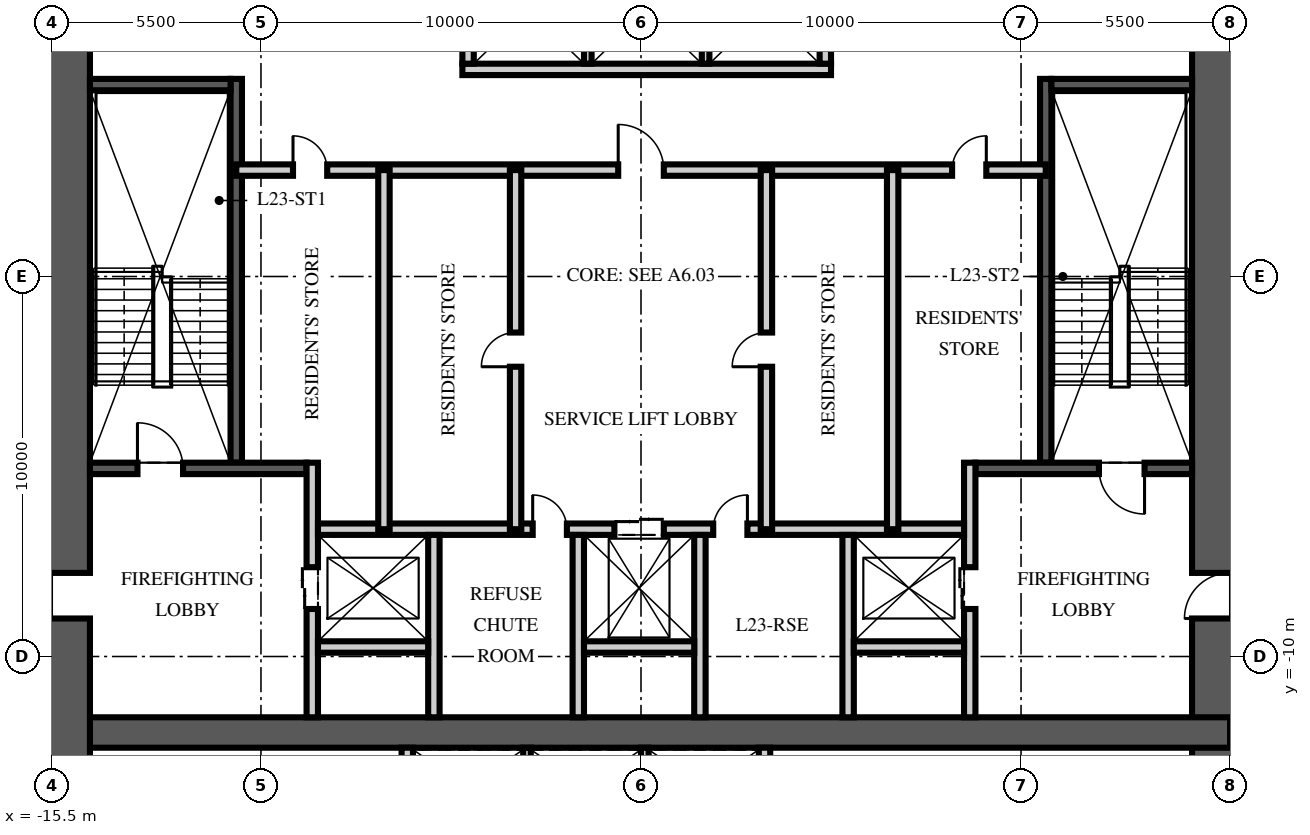
"""IFC4 building model, lengths in metres.
Left out: names, types, materials, properties, quantities, classifications, styles, units other than length and angle.
Written with IfcOpenShell. Run it as: python <this file> out.ifc"""

import sys

from ifc_helpers import new_model, si_unit, direction, frame, frame_2d, origin, place, context, subcontext, project, spatial, rectangle, extrude, element, fill, save


model = new_model("IFC4")
c1 = context("Model", 3, precision=1e-05, world=origin(), true_north=direction((0.0, 1.0)))
c2 = subcontext(c1, "Body", "Model", "MODEL_VIEW")
j1 = project(units=[si_unit("LENGTHUNIT", "METRE"), si_unit("PLANEANGLEUNIT", "RADIAN")], contexts=[c1])
p1 = place(None, origin())
s1 = spatial("IfcSite", under=j1, at=p1, CompositionType="ELEMENT")
p2 = place(p1, origin())
s2 = spatial("IfcBuilding", under=s1, at=p2, CompositionType="ELEMENT")
p3 = place(p2, frame((0.0, 0.0, 92.25)))
s3 = spatial("IfcBuildingStorey", under=s2, at=p3, CompositionType="ELEMENT", Elevation=92.25)
p4 = place(p3, frame((15.5, -15.5, -0.25), z_axis=(0.0, 0.0, 1.0), x_axis=(0.0, 1.0, 0.0)))
e1 = element("IfcWall", 1, at=p4, inside=s3, PredefinedType="SHEAR", context=c2, shape_type="SweptSolid", body=[
    extrude(rectangle(XDim=31.0, YDim=2.0, at=frame_2d((15.5, 0.0))), origin(), (0.0, 0.0, 1.0), 3.75),
])
p5 = place(p4, frame((6.5, 0.0, 0.25)))
e2 = element("IfcOpeningElement", 2, at=p5, cuts=e1, PredefinedType="OPENING", context=c2, shape_type="SweptSolid", body=[
    extrude(rectangle(XDim=1.2, YDim=2.1, at=frame_2d((0.6, 1.05))), frame((0.0, 1.01, 0.0), z_axis=(0.0, -1.0, 0.0), x_axis=(1.0, 0.0, 0.0)), (0.0, 0.0, 1.0), 2.02),
])
p6 = place(p4, frame((23.0, 0.0, 0.25)))
e3 = element("IfcOpeningElement", 3, at=p6, cuts=e1, PredefinedType="OPENING", context=c2, shape_type="SweptSolid", body=[
    extrude(rectangle(XDim=1.8, YDim=2.1, at=frame_2d((0.9, 1.05))), frame((0.0, 1.01, 0.0), z_axis=(0.0, -1.0, 0.0), x_axis=(1.0, 0.0, 0.0)), (0.0, 0.0, 1.0), 2.02),
])
p7 = place(p3, frame((-15.5, -12.0, -0.25), z_axis=(0.0, 0.0, 1.0), x_axis=(1.0, 0.0, 0.0)))
e4 = element("IfcWall", 4, at=p7, inside=s3, PredefinedType="SHEAR", context=c2, shape_type="SweptSolid", body=[
    extrude(rectangle(XDim=31.0, YDim=0.8, at=frame_2d((15.5, 0.0))), origin(), (0.0, 0.0, 1.0), 3.75),
])
p8 = place(p3, frame((-15.5, -15.5, -0.25), z_axis=(0.0, 0.0, 1.0), x_axis=(0.0, 1.0, 0.0)))
e5 = element("IfcWall", 5, at=p8, inside=s3, PredefinedType="SHEAR", context=c2, shape_type="SweptSolid", body=[
    extrude(rectangle(XDim=31.0, YDim=2.0, at=frame_2d((15.5, 0.0))), origin(), (0.0, 0.0, 1.0), 3.75),
])
p9 = place(p8, frame((6.5, 0.0, 0.25)))
e6 = element("IfcOpeningElement", 6, at=p9, cuts=e5, PredefinedType="OPENING", context=c2, shape_type="SweptSolid", body=[
    extrude(rectangle(XDim=1.2, YDim=2.1, at=frame_2d((0.6, 1.05))), frame((0.0, 1.01, 0.0), z_axis=(0.0, -1.0, 0.0), x_axis=(1.0, 0.0, 0.0)), (0.0, 0.0, 1.0), 2.02),
])
p10 = place(p8, frame((23.0, 0.0, 0.25)))
e7 = element("IfcOpeningElement", 7, at=p10, cuts=e5, PredefinedType="OPENING", context=c2, shape_type="SweptSolid", body=[
    extrude(rectangle(XDim=1.8, YDim=2.1, at=frame_2d((0.9, 1.05))), frame((0.0, 1.01, 0.0), z_axis=(0.0, -1.0, 0.0), x_axis=(1.0, 0.0, 0.0)), (0.0, 0.0, 1.0), 2.02),
])
p11 = place(p3, frame((-10.65, -4.9, 0.0), z_axis=(0.0, 0.0, 1.0), x_axis=(0.0, 1.0, 0.0)))
e8 = element("IfcWall", 8, at=p11, inside=s3, PredefinedType="SOLIDWALL", context=c2, shape_type="SweptSolid", body=[
    extrude(rectangle(XDim=10.1, YDim=0.3, at=frame_2d((5.05, 0.0))), origin(), (0.0, 0.0, 1.0), 3.5),
])
p12 = place(p3, frame((-14.5, -5.05, 0.0), z_axis=(0.0, 0.0, 1.0), x_axis=(1.0, 0.0, 0.0)))
e9 = element("IfcWall", 9, at=p12, inside=s3, PredefinedType="SOLIDWALL", context=c2, shape_type="SweptSolid", body=[
    extrude(rectangle(XDim=5.7, YDim=0.3, at=frame_2d((2.85, 0.0))), origin(), (0.0, 0.0, 1.0), 3.5),
])
p13 = place(p12, frame((1.25, 0.0, 0.0)))
e10 = element("IfcOpeningElement", 10, at=p13, cuts=e9, PredefinedType="OPENING", context=c2, shape_type="SweptSolid", body=[
    extrude(rectangle(XDim=1.2, YDim=2.1, at=frame_2d((0.6, 1.05))), frame((0.0, 0.16, 0.0), z_axis=(0.0, -1.0, 0.0), x_axis=(1.0, 0.0, 0.0)), (0.0, 0.0, 1.0), 0.32),
])
p14 = place(p3, frame((-14.5, 5.05, 0.0), z_axis=(0.0, 0.0, 1.0), x_axis=(1.0, 0.0, 0.0)))
e11 = element("IfcWall", 11, at=p14, inside=s3, PredefinedType="SOLIDWALL", context=c2, shape_type="SweptSolid", body=[
    extrude(rectangle(XDim=3.7, YDim=0.3, at=frame_2d((1.85, 0.0))), origin(), (0.0, 0.0, 1.0), 3.5),
])
p15 = place(p3, frame((-8.65, -11.6, 0.0), z_axis=(0.0, 0.0, 1.0), x_axis=(0.0, 1.0, 0.0)))
e12 = element("IfcWall", 12, at=p15, inside=s3, PredefinedType="PARTITIONING", context=c2, shape_type="SweptSolid", body=[
    extrude(rectangle(XDim=6.7, YDim=0.3, at=frame_2d((3.35, 0.0))), origin(), (0.0, 0.0, 1.0), 3.5),
])
p16 = place(p15, frame((2.85, 0.0, 0.0)))
e13 = element("IfcOpeningElement", 13, at=p16, cuts=e12, PredefinedType="OPENING", context=c2, shape_type="SweptSolid", body=[
    extrude(rectangle(XDim=1.1, YDim=2.1, at=frame_2d((0.55, 1.05))), frame((0.0, 0.16, 0.0), z_axis=(0.0, -1.0, 0.0), x_axis=(1.0, 0.0, 0.0)), (0.0, 0.0, 1.0), 0.32),
])
p17 = place(p3, frame((10.65, -4.9, 0.0), z_axis=(0.0, 0.0, 1.0), x_axis=(0.0, 1.0, 0.0)))
e14 = element("IfcWall", 14, at=p17, inside=s3, PredefinedType="SOLIDWALL", context=c2, shape_type="SweptSolid", body=[
    extrude(rectangle(XDim=10.1, YDim=0.3, at=frame_2d((5.05, 0.0))), origin(), (0.0, 0.0, 1.0), 3.5),
])
p18 = place(p3, frame((14.5, -5.05, 0.0), z_axis=(0.0, 0.0, 1.0), x_axis=(-1.0, 0.0, 0.0)))
e15 = element("IfcWall", 15, at=p18, inside=s3, PredefinedType="SOLIDWALL", context=c2, shape_type="SweptSolid", body=[
    extrude(rectangle(XDim=5.7, YDim=0.3, at=frame_2d((2.85, 0.0))), origin(), (0.0, 0.0, 1.0), 3.5),
])
p19 = place(p18, frame((1.25, 0.0, 0.0)))
e16 = element("IfcOpeningElement", 16, at=p19, cuts=e15, PredefinedType="OPENING", context=c2, shape_type="SweptSolid", body=[
    extrude(rectangle(XDim=1.2, YDim=2.1, at=frame_2d((0.6, 1.05))), frame((0.0, 0.16, 0.0), z_axis=(0.0, -1.0, 0.0), x_axis=(1.0, 0.0, 0.0)), (0.0, 0.0, 1.0), 0.32),
])
p20 = place(p3, frame((14.5, 5.05, 0.0), z_axis=(0.0, 0.0, 1.0), x_axis=(-1.0, 0.0, 0.0)))
e17 = element("IfcWall", 17, at=p20, inside=s3, PredefinedType="SOLIDWALL", context=c2, shape_type="SweptSolid", body=[
    extrude(rectangle(XDim=3.7, YDim=0.3, at=frame_2d((1.85, 0.0))), origin(), (0.0, 0.0, 1.0), 3.5),
])
p21 = place(p3, frame((8.65, -11.6, 0.0), z_axis=(0.0, 0.0, 1.0), x_axis=(0.0, 1.0, 0.0)))
e18 = element("IfcWall", 18, at=p21, inside=s3, PredefinedType="PARTITIONING", context=c2, shape_type="SweptSolid", body=[
    extrude(rectangle(XDim=6.7, YDim=0.3, at=frame_2d((3.35, 0.0))), origin(), (0.0, 0.0, 1.0), 3.5),
])
p22 = place(p21, frame((2.85, 0.0, 0.0)))
e19 = element("IfcOpeningElement", 19, at=p22, cuts=e18, PredefinedType="OPENING", context=c2, shape_type="SweptSolid", body=[
    extrude(rectangle(XDim=1.1, YDim=2.1, at=frame_2d((0.55, 1.05))), frame((0.0, 0.16, 0.0), z_axis=(0.0, -1.0, 0.0), x_axis=(1.0, 0.0, 0.0)), (0.0, 0.0, 1.0), 0.32),
])
p23 = place(p3, frame((-8.5, -6.65, 0.0), z_axis=(0.0, 0.0, 1.0), x_axis=(1.0, 0.0, 0.0)))
e20 = element("IfcWall", 20, at=p23, inside=s3, PredefinedType="PARTITIONING", context=c2, shape_type="SweptSolid", body=[
    extrude(rectangle(XDim=17.0, YDim=0.3, at=frame_2d((8.5, 0.0))), origin(), (0.0, 0.0, 1.0), 3.5),
])
p24 = place(p23, frame((7.8, 0.0, 0.0)))
e21 = element("IfcOpeningElement", 21, at=p24, cuts=e20, PredefinedType="OPENING", context=c2, shape_type="SweptSolid", body=[
    extrude(rectangle(XDim=1.3, YDim=2.4, at=frame_2d((0.65, 1.2))), frame((0.0, 0.16, 0.0), z_axis=(0.0, -1.0, 0.0), x_axis=(1.0, 0.0, 0.0)), (0.0, 0.0, 1.0), 0.32),
])
p25 = place(p23, frame((5.65, 0.0, 0.0)))
e22 = element("IfcOpeningElement", 22, at=p25, cuts=e20, PredefinedType="OPENING", context=c2, shape_type="SweptSolid", body=[
    extrude(rectangle(XDim=0.9, YDim=2.1, at=frame_2d((0.45, 1.05))), frame((0.0, 0.16, 0.0), z_axis=(0.0, -1.0, 0.0), x_axis=(1.0, 0.0, 0.0)), (0.0, 0.0, 1.0), 0.32),
])
p26 = place(p23, frame((10.4, 0.0, 0.0)))
e23 = element("IfcOpeningElement", 23, at=p26, cuts=e20, PredefinedType="OPENING", context=c2, shape_type="SweptSolid", body=[
    extrude(rectangle(XDim=0.9, YDim=2.1, at=frame_2d((0.45, 1.05))), frame((0.0, 0.16, 0.0), z_axis=(0.0, -1.0, 0.0), x_axis=(1.0, 0.0, 0.0)), (0.0, 0.0, 1.0), 0.32),
])
for number, where, z_axis, x_axis in (
    (24, (-5.45, -11.6, 0.0), (0.0, 0.0, 1.0), (0.0, 1.0, 0.0)),
    (25, (-1.65, -11.6, 0.0), (0.0, 0.0, 1.0), (0.0, 1.0, 0.0)),
    (26, (1.55, -11.6, 0.0), (0.0, 0.0, 1.0), (0.0, 1.0, 0.0)),
    (27, (5.45, -11.6, 0.0), (0.0, 0.0, 1.0), (0.0, 1.0, 0.0)),
):
    element("IfcWall", number, at=place(p3, frame(where, z_axis=z_axis, x_axis=x_axis)), inside=s3, PredefinedType="PARTITIONING", context=c2, shape_type="SweptSolid", body=[
        extrude(rectangle(XDim=4.8, YDim=0.3, at=frame_2d((2.4, 0.0))), origin(), (0.0, 0.0, 1.0), 3.5),
    ])
for number, where, z_axis, x_axis in (
    (28, (-8.5, -9.75, 0.0), (0.0, 0.0, 1.0), (1.0, 0.0, 0.0)),
    (29, (-1.5, -9.75, 0.0), (0.0, 0.0, 1.0), (1.0, 0.0, 0.0)),
    (30, (5.6, -9.75, 0.0), (0.0, 0.0, 1.0), (1.0, 0.0, 0.0)),
):
    element("IfcWall", number, at=place(p3, frame(where, z_axis=z_axis, x_axis=x_axis)), inside=s3, PredefinedType="PARTITIONING", context=c2, shape_type="SweptSolid", body=[
        extrude(rectangle(XDim=2.9, YDim=0.3, at=frame_2d((1.45, 0.0))), origin(), (0.0, 0.0, 1.0), 3.5),
    ])
p27 = place(p3, frame((-4.7, 5.45, 0.0), z_axis=(0.0, 0.0, 1.0), x_axis=(1.0, 0.0, 0.0)))
e31 = element("IfcWall", 31, at=p27, inside=s3, PredefinedType="PARTITIONING", context=c2, shape_type="SweptSolid", body=[
    extrude(rectangle(XDim=9.7, YDim=0.3, at=frame_2d((4.85, 0.0))), origin(), (0.0, 0.0, 1.0), 3.5),
])
for number, where, z_axis, x_axis in (
    (32, (-4.55, 5.6, 0.0), (0.0, 0.0, 1.0), (0.0, 1.0, 0.0)),
    (33, (4.85, 5.6, 0.0), (0.0, 0.0, 1.0), (0.0, 1.0, 0.0)),
):
    element("IfcWall", number, at=place(p3, frame(where, z_axis=z_axis, x_axis=x_axis)), inside=s3, PredefinedType="PARTITIONING", context=c2, shape_type="SweptSolid", body=[
        extrude(rectangle(XDim=2.8, YDim=0.3, at=frame_2d((1.4, 0.0))), origin(), (0.0, 0.0, 1.0), 3.5),
    ])
for number, where, z_axis, x_axis in (
    (34, (-1.4, 5.6, 0.0), (0.0, 0.0, 1.0), (0.0, 1.0, 0.0)),
    (35, (1.7, 5.6, 0.0), (0.0, 0.0, 1.0), (0.0, 1.0, 0.0)),
):
    element("IfcWall", number, at=place(p3, frame(where, z_axis=z_axis, x_axis=x_axis)), inside=s3, PredefinedType="PARTITIONING", context=c2, shape_type="SweptSolid", body=[
        extrude(rectangle(XDim=2.8, YDim=0.2, at=frame_2d((1.4, 0.0))), origin(), (0.0, 0.0, 1.0), 3.5),
    ])
for number, where, z_axis, x_axis in (
    (36, (-6.15, -14.5, 0.0), (0.0, 0.0, 1.0), (0.0, 1.0, 0.0)),
    (37, (3.25, -14.5, 0.0), (0.0, 0.0, 1.0), (0.0, 1.0, 0.0)),
):
    element("IfcWall", number, at=place(p3, frame(where, z_axis=z_axis, x_axis=x_axis)), inside=s3, PredefinedType="PARTITIONING", context=c2, shape_type="SweptSolid", body=[
        extrude(rectangle(XDim=2.1, YDim=0.3, at=frame_2d((1.05, 0.0))), origin(), (0.0, 0.0, 1.0), 3.5),
    ])
for number, where, z_axis, x_axis in (
    (38, (-3.0, -14.5, 0.0), (0.0, 0.0, 1.0), (0.0, 1.0, 0.0)),
    (39, (0.1, -14.5, 0.0), (0.0, 0.0, 1.0), (0.0, 1.0, 0.0)),
):
    element("IfcWall", number, at=place(p3, frame(where, z_axis=z_axis, x_axis=x_axis)), inside=s3, PredefinedType="PARTITIONING", context=c2, shape_type="SweptSolid", body=[
        extrude(rectangle(XDim=2.1, YDim=0.2, at=frame_2d((1.05, 0.0))), origin(), (0.0, 0.0, 1.0), 3.5),
    ])
p28 = place(p3, frame((-10.65, 2.8, 0.0), z_axis=(0.0, 0.0, 1.0), x_axis=(1.0, 0.0, 0.0)))
e40 = element("IfcWall", 40, at=p28, inside=s3, PredefinedType="PARTITIONING", context=c2, shape_type="SweptSolid", body=[
    extrude(rectangle(XDim=21.3, YDim=0.3, at=frame_2d((10.65, 0.0))), origin(), (0.0, 0.0, 1.0), 3.5),
])
p29 = place(p28, frame((10.05, 0.0, 0.0)))
e41 = element("IfcOpeningElement", 41, at=p29, cuts=e40, PredefinedType="OPENING", context=c2, shape_type="SweptSolid", body=[
    extrude(rectangle(XDim=1.2, YDim=2.1, at=frame_2d((0.6, 1.05))), frame((0.0, 0.16, 0.0), z_axis=(0.0, -1.0, 0.0), x_axis=(1.0, 0.0, 0.0)), (0.0, 0.0, 1.0), 0.32),
])
p30 = place(p28, frame((1.493, 0.0, 0.0)))
e42 = element("IfcOpeningElement", 42, at=p30, cuts=e40, PredefinedType="OPENING", context=c2, shape_type="SweptSolid", body=[
    extrude(rectangle(XDim=0.9, YDim=2.1, at=frame_2d((0.45, 1.05))), frame((0.0, 0.16, 0.0), z_axis=(0.0, -1.0, 0.0), x_axis=(1.0, 0.0, 0.0)), (0.0, 0.0, 1.0), 0.32),
])
p31 = place(p28, frame((18.836, 0.0, 0.0)))
e43 = element("IfcOpeningElement", 43, at=p31, cuts=e40, PredefinedType="OPENING", context=c2, shape_type="SweptSolid", body=[
    extrude(rectangle(XDim=0.9, YDim=2.1, at=frame_2d((0.45, 1.05))), frame((0.0, 0.16, 0.0), z_axis=(0.0, -1.0, 0.0), x_axis=(1.0, 0.0, 0.0)), (0.0, 0.0, 1.0), 0.32),
])
p32 = place(p3, frame((-3.3, -6.65, 0.0), z_axis=(0.0, 0.0, 1.0), x_axis=(0.0, 1.0, 0.0)))
e44 = element("IfcWall", 44, at=p32, inside=s3, PredefinedType="PARTITIONING", context=c2, shape_type="SweptSolid", body=[
    extrude(rectangle(XDim=9.45, YDim=0.3, at=frame_2d((4.725, 0.0))), origin(), (0.0, 0.0, 1.0), 3.5),
])
p33 = place(p32, frame((4.275, 0.0, 0.0)))
e45 = element("IfcOpeningElement", 45, at=p33, cuts=e44, PredefinedType="OPENING", context=c2, shape_type="SweptSolid", body=[
    extrude(rectangle(XDim=0.9, YDim=2.1, at=frame_2d((0.45, 1.05))), frame((0.0, 0.16, 0.0), z_axis=(0.0, -1.0, 0.0), x_axis=(1.0, 0.0, 0.0)), (0.0, 0.0, 1.0), 0.32),
])
p34 = place(p3, frame((3.3, -6.65, 0.0), z_axis=(0.0, 0.0, 1.0), x_axis=(0.0, 1.0, 0.0)))
e46 = element("IfcWall", 46, at=p34, inside=s3, PredefinedType="PARTITIONING", context=c2, shape_type="SweptSolid", body=[
    extrude(rectangle(XDim=9.45, YDim=0.3, at=frame_2d((4.725, 0.0))), origin(), (0.0, 0.0, 1.0), 3.5),
])
p35 = place(p34, frame((4.275, 0.0, 0.0)))
e47 = element("IfcOpeningElement", 47, at=p35, cuts=e46, PredefinedType="OPENING", context=c2, shape_type="SweptSolid", body=[
    extrude(rectangle(XDim=0.9, YDim=2.1, at=frame_2d((0.45, 1.05))), frame((0.0, 0.16, 0.0), z_axis=(0.0, -1.0, 0.0), x_axis=(1.0, 0.0, 0.0)), (0.0, 0.0, 1.0), 0.32),
])
for number, where, z_axis, x_axis in (
    (48, (-6.764, -6.65, 0.0), (0.0, 0.0, 1.0), (0.0, 1.0, 0.0)),
    (49, (6.622, -6.65, 0.0), (0.0, 0.0, 1.0), (0.0, 1.0, 0.0)),
):
    element("IfcWall", number, at=place(p3, frame(where, z_axis=z_axis, x_axis=x_axis)), inside=s3, PredefinedType="PARTITIONING", context=c2, shape_type="SweptSolid", body=[
        extrude(rectangle(XDim=9.45, YDim=0.3, at=frame_2d((4.725, 0.0))), origin(), (0.0, 0.0, 1.0), 3.5),
    ])
p36 = place(p13, origin())
e50 = element("IfcDoor", 50, at=p36, inside=s3, OperationType="SINGLE_SWING_LEFT", PredefinedType="DOOR", context=c2, shape_type="SweptSolid", body=[
    extrude(rectangle(XDim=1.2, YDim=2.1, at=frame_2d((0.6, 1.05))), frame((0.0, 0.025, 0.0), z_axis=(0.0, -1.0, 0.0), x_axis=(1.0, 0.0, 0.0)), (0.0, 0.0, 1.0), 0.05),
])
fill(e10, e50)
p37 = place(p9, origin())
e51 = element("IfcDoor", 51, at=p37, inside=s3, OperationType="SINGLE_SWING_LEFT", PredefinedType="DOOR", context=c2, shape_type="SweptSolid", body=[
    extrude(rectangle(XDim=1.2, YDim=2.1, at=frame_2d((0.6, 1.05))), frame((0.0, 0.025, 0.0), z_axis=(0.0, -1.0, 0.0), x_axis=(1.0, 0.0, 0.0)), (0.0, 0.0, 1.0), 0.05),
])
fill(e6, e51)
p38 = place(p19, origin())
e52 = element("IfcDoor", 52, at=p38, inside=s3, OperationType="SINGLE_SWING_LEFT", PredefinedType="DOOR", context=c2, shape_type="SweptSolid", body=[
    extrude(rectangle(XDim=1.2, YDim=2.1, at=frame_2d((0.6, 1.05))), frame((0.0, 0.025, 0.0), z_axis=(0.0, -1.0, 0.0), x_axis=(1.0, 0.0, 0.0)), (0.0, 0.0, 1.0), 0.05),
])
fill(e16, e52)
p39 = place(p5, origin())
e53 = element("IfcDoor", 53, at=p39, inside=s3, OperationType="SINGLE_SWING_LEFT", PredefinedType="DOOR", context=c2, shape_type="SweptSolid", body=[
    extrude(rectangle(XDim=1.2, YDim=2.1, at=frame_2d((0.6, 1.05))), frame((0.0, 0.025, 0.0), z_axis=(0.0, -1.0, 0.0), x_axis=(1.0, 0.0, 0.0)), (0.0, 0.0, 1.0), 0.05),
])
fill(e2, e53)
p40 = place(p16, origin())
e54 = element("IfcDoor", 54, at=p40, inside=s3, OperationType="DOUBLE_DOOR_SLIDING", PredefinedType="DOOR", context=c2, shape_type="SweptSolid", body=[
    extrude(rectangle(XDim=1.1, YDim=2.1, at=frame_2d((0.55, 1.05))), frame((0.0, 0.025, 0.0), z_axis=(0.0, -1.0, 0.0), x_axis=(1.0, 0.0, 0.0)), (0.0, 0.0, 1.0), 0.05),
])
fill(e13, e54)
p41 = place(p22, origin())
e55 = element("IfcDoor", 55, at=p41, inside=s3, OperationType="DOUBLE_DOOR_SLIDING", PredefinedType="DOOR", context=c2, shape_type="SweptSolid", body=[
    extrude(rectangle(XDim=1.1, YDim=2.1, at=frame_2d((0.55, 1.05))), frame((0.0, 0.025, 0.0), z_axis=(0.0, -1.0, 0.0), x_axis=(1.0, 0.0, 0.0)), (0.0, 0.0, 1.0), 0.05),
])
fill(e19, e55)
p42 = place(p24, origin())
e56 = element("IfcDoor", 56, at=p42, inside=s3, OperationType="DOUBLE_DOOR_SLIDING", PredefinedType="DOOR", context=c2, shape_type="SweptSolid", body=[
    extrude(rectangle(XDim=1.3, YDim=2.4, at=frame_2d((0.65, 1.2))), frame((0.0, 0.025, 0.0), z_axis=(0.0, -1.0, 0.0), x_axis=(1.0, 0.0, 0.0)), (0.0, 0.0, 1.0), 0.05),
])
fill(e21, e56)
p43 = place(p29, origin())
e57 = element("IfcDoor", 57, at=p43, inside=s3, OperationType="SINGLE_SWING_LEFT", PredefinedType="DOOR", context=c2, shape_type="SweptSolid", body=[
    extrude(rectangle(XDim=1.2, YDim=2.1, at=frame_2d((0.6, 1.05))), frame((0.0, 0.025, 0.0), z_axis=(0.0, -1.0, 0.0), x_axis=(1.0, 0.0, 0.0)), (0.0, 0.0, 1.0), 0.05),
])
fill(e41, e57)
p44 = place(p25, origin())
e58 = element("IfcDoor", 58, at=p44, inside=s3, OperationType="SINGLE_SWING_LEFT", PredefinedType="DOOR", context=c2, shape_type="SweptSolid", body=[
    extrude(rectangle(XDim=0.9, YDim=2.1, at=frame_2d((0.45, 1.05))), frame((0.0, 0.025, 0.0), z_axis=(0.0, -1.0, 0.0), x_axis=(1.0, 0.0, 0.0)), (0.0, 0.0, 1.0), 0.05),
])
fill(e22, e58)
p45 = place(p26, origin())
e59 = element("IfcDoor", 59, at=p45, inside=s3, OperationType="SINGLE_SWING_RIGHT", PredefinedType="DOOR", context=c2, shape_type="SweptSolid", body=[
    extrude(rectangle(XDim=0.9, YDim=2.1, at=frame_2d((0.45, 1.05))), frame((0.0, 0.025, 0.0), z_axis=(0.0, -1.0, 0.0), x_axis=(1.0, 0.0, 0.0)), (0.0, 0.0, 1.0), 0.05),
])
fill(e23, e59)
p46 = place(p33, origin())
e60 = element("IfcDoor", 60, at=p46, inside=s3, OperationType="SINGLE_SWING_LEFT", PredefinedType="DOOR", context=c2, shape_type="SweptSolid", body=[
    extrude(rectangle(XDim=0.9, YDim=2.1, at=frame_2d((0.45, 1.05))), frame((0.0, 0.025, 0.0), z_axis=(0.0, -1.0, 0.0), x_axis=(1.0, 0.0, 0.0)), (0.0, 0.0, 1.0), 0.05),
])
fill(e45, e60)
p47 = place(p30, origin())
e61 = element("IfcDoor", 61, at=p47, inside=s3, OperationType="SINGLE_SWING_LEFT", PredefinedType="DOOR", context=c2, shape_type="SweptSolid", body=[
    extrude(rectangle(XDim=0.9, YDim=2.1, at=frame_2d((0.45, 1.05))), frame((0.0, 0.025, 0.0), z_axis=(0.0, -1.0, 0.0), x_axis=(1.0, 0.0, 0.0)), (0.0, 0.0, 1.0), 0.05),
])
fill(e42, e61)
p48 = place(p35, origin())
e62 = element("IfcDoor", 62, at=p48, inside=s3, OperationType="SINGLE_SWING_LEFT", PredefinedType="DOOR", context=c2, shape_type="SweptSolid", body=[
    extrude(rectangle(XDim=0.9, YDim=2.1, at=frame_2d((0.45, 1.05))), frame((0.0, 0.025, 0.0), z_axis=(0.0, -1.0, 0.0), x_axis=(1.0, 0.0, 0.0)), (0.0, 0.0, 1.0), 0.05),
])
fill(e47, e62)
p49 = place(p31, origin())
e63 = element("IfcDoor", 63, at=p49, inside=s3, OperationType="SINGLE_SWING_RIGHT", PredefinedType="DOOR", context=c2, shape_type="SweptSolid", body=[
    extrude(rectangle(XDim=0.9, YDim=2.1, at=frame_2d((0.45, 1.05))), frame((0.0, 0.025, 0.0), z_axis=(0.0, -1.0, 0.0), x_axis=(1.0, 0.0, 0.0)), (0.0, 0.0, 1.0), 0.05),
])
fill(e43, e63)
save(model, sys.argv[1])
